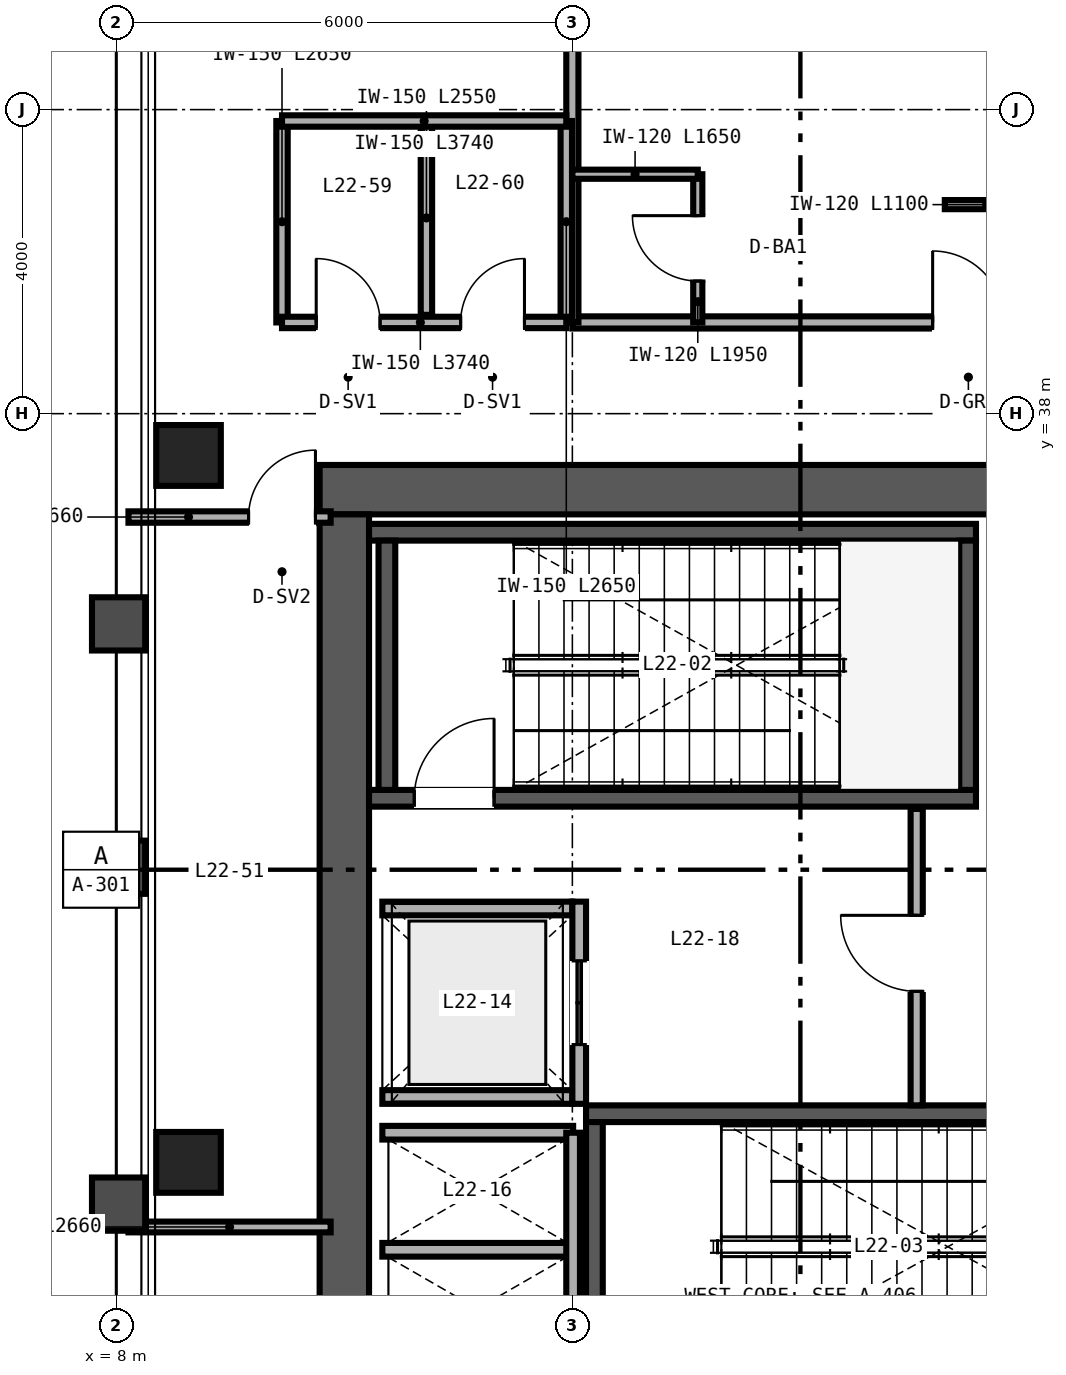
"""IFC4 building model, lengths in metres.
Left out: names, types, materials, properties, quantities, classifications, styles, units other than length and angle.
Written with IfcOpenShell. Run it as: python <this file> out.ifc"""

import sys

from ifc_helpers import new_model, si_unit, direction, frame, frame_2d, origin, origin_2d, place, context, subcontext, project, spatial, rectangle, hollow_rectangle, extrude, source, transform, mapped, element, fill, save


model = new_model("IFC4")
c1 = context("Model", 3, precision=1e-05, world=origin(), true_north=direction((0.0, 1.0)))
c2 = subcontext(c1, "Body", "Model", "MODEL_VIEW")
j1 = project(units=[si_unit("LENGTHUNIT", "METRE"), si_unit("PLANEANGLEUNIT", "RADIAN")], contexts=[c1])
p1 = place(None, origin())
s1 = spatial("IfcSite", under=j1, at=p1, CompositionType="ELEMENT")
p2 = place(p1, origin())
s2 = spatial("IfcBuilding", under=s1, at=p2, CompositionType="ELEMENT")
p3 = place(p2, frame((0.0, 0.0, 92.4)))
s3 = spatial("IfcBuildingStorey", under=s2, at=p3, CompositionType="ELEMENT", Elevation=92.4)
p4 = place(p3, frame((10.675, 37.0, 0.0), z_axis=(0.0, 0.0, 1.0), x_axis=(1.0, 0.0, 0.0)))
e1 = element("IfcWall", 1, at=p4, inside=s3, PredefinedType="SHEAR", context=c2, shape_type="SweptSolid", body=[
    extrude(rectangle(XDim=12.65, YDim=0.65, at=frame_2d((6.325, 0.0))), origin(), (0.0, 0.0, 1.0), 4.56),
])
p5 = place(p4, frame((8.905, 0.0, 0.0)))
e2 = element("IfcOpeningElement", 2, at=p5, cuts=e1, PredefinedType="OPENING", context=c2, shape_type="SweptSolid", body=[
    extrude(rectangle(XDim=1.0, YDim=2.15, at=frame_2d((0.5, 1.075))), frame((0.0, 0.335, 0.0), z_axis=(0.0, -1.0, 0.0), x_axis=(1.0, 0.0, 0.0)), (0.0, 0.0, 1.0), 0.67),
])
p6 = place(p3, frame((11.0, 15.325, 0.0), z_axis=(0.0, 0.0, 1.0), x_axis=(0.0, 1.0, 0.0)))
e3 = element("IfcWall", 3, at=p6, inside=s3, PredefinedType="SHEAR", context=c2, shape_type="SweptSolid", body=[
    extrude(rectangle(XDim=21.35, YDim=0.65, at=frame_2d((10.675, 0.0))), origin(), (0.0, 0.0, 1.0), 4.56),
])
p7 = place(p3, frame((11.325, 32.94, 0.0), z_axis=(0.0, 0.0, 1.0), x_axis=(1.0, 0.0, 0.0)))
e4 = element("IfcWall", 4, at=p7, inside=s3, PredefinedType="SHEAR", context=c2, shape_type="SweptSolid", body=[
    extrude(rectangle(XDim=7.985, YDim=0.22, at=frame_2d((3.993, 0.0))), origin(), (0.0, 0.0, 1.0), 4.6),
])
p8 = place(p7, frame((0.595, 0.0, 0.0)))
e5 = element("IfcOpeningElement", 5, at=p8, cuts=e4, PredefinedType="OPENING", context=c2, shape_type="SweptSolid", body=[
    extrude(rectangle(XDim=1.05, YDim=2.15, at=frame_2d((0.525, 1.075))), frame((0.0, 0.12, 0.0), z_axis=(0.0, -1.0, 0.0), x_axis=(1.0, 0.0, 0.0)), (0.0, 0.0, 1.0), 0.24),
])
p9 = place(p3, frame((11.325, 36.44, 0.0), z_axis=(0.0, 0.0, 1.0), x_axis=(1.0, 0.0, 0.0)))
e6 = element("IfcWall", 6, at=p9, inside=s3, PredefinedType="SHEAR", context=c2, shape_type="SweptSolid", body=[
    extrude(rectangle(XDim=7.985, YDim=0.22, at=frame_2d((3.993, 0.0))), origin(), (0.0, 0.0, 1.0), 4.6),
])
for number, where, z_axis, x_axis in (
    (7, (11.56, 33.05, 0.0), (0.0, 0.0, 1.0), (0.0, 1.0, 0.0)),
    (8, (19.2, 33.05, 0.0), (0.0, 0.0, 1.0), (0.0, 1.0, 0.0)),
):
    element("IfcWall", number, at=place(p3, frame(where, z_axis=z_axis, x_axis=x_axis)), inside=s3, PredefinedType="SHEAR", context=c2, shape_type="SweptSolid", body=[
        extrude(rectangle(XDim=3.28, YDim=0.22, at=frame_2d((1.64, 0.0))), origin(), (0.0, 0.0, 1.0), 4.6),
    ])
p10 = place(p3, frame((14.18, 28.79, 0.0), z_axis=(0.0, 0.0, 1.0), x_axis=(1.0, 0.0, 0.0)))
e9 = element("IfcWall", 9, at=p10, inside=s3, PredefinedType="SHEAR", context=c2, shape_type="SweptSolid", body=[
    extrude(rectangle(XDim=8.495, YDim=0.22, at=frame_2d((4.248, 0.0))), origin(), (0.0, 0.0, 1.0), 4.6),
])
p11 = place(p3, frame((14.29, 25.4, 0.0), z_axis=(0.0, 0.0, 1.0), x_axis=(0.0, 1.0, 0.0)))
e10 = element("IfcWall", 10, at=p11, inside=s3, PredefinedType="SHEAR", context=c2, shape_type="SweptSolid", body=[
    extrude(rectangle(XDim=3.28, YDim=0.22, at=frame_2d((1.64, 0.0))), origin(), (0.0, 0.0, 1.0), 4.6),
])
m1 = source(origin(), c2, "Body", "SweptSolid", [
    extrude(hollow_rectangle(XDim=0.85, YDim=0.8, WallThickness=0.032, at=origin_2d()), origin(), (0.0, 0.0, 1.0), 4.56),
])
for number, where, z_axis, x_axis in (
    (11, (8.95, 28.15, 0.0), (0.0, 0.0, 1.0), (1.0, 0.0, 0.0)),
    (12, (8.95, 37.45, 0.0), (0.0, 0.0, 1.0), (1.0, 0.0, 0.0)),
):
    element("IfcColumn", number, at=place(p3, frame(where, z_axis=z_axis, x_axis=x_axis)), inside=s3, PredefinedType="COLUMN", context=c2, shape_type="MappedRepresentation", body=[
        mapped(m1, transform((0.0, 0.0, 0.0), scale=1.0)),
    ])
for number, where, z_axis, x_axis in (
    (13, (11.5, 29.01, 0.0), (0.0, 0.0, 1.0), (1.0, 0.0, 0.0)),
    (14, (11.5, 31.49, 0.0), (0.0, 0.0, 1.0), (1.0, 0.0, 0.0)),
):
    element("IfcWall", number, at=place(p3, frame(where, z_axis=z_axis, x_axis=x_axis)), inside=s3, PredefinedType="SOLIDWALL", context=c2, shape_type="SweptSolid", body=[
        extrude(rectangle(XDim=2.5, YDim=0.18, at=frame_2d((1.25, 0.0))), origin(), (0.0, 0.0, 1.0), 4.56),
    ])
p12 = place(p3, frame((14.09, 28.92, 0.0), z_axis=(0.0, 0.0, 1.0), x_axis=(0.0, 1.0, 0.0)))
e15 = element("IfcWall", 15, at=p12, inside=s3, PredefinedType="SOLIDWALL", context=c2, shape_type="SweptSolid", body=[
    extrude(rectangle(XDim=2.66, YDim=0.18, at=frame_2d((1.33, 0.0))), origin(), (0.0, 0.0, 1.0), 4.56),
])
p13 = place(p12, frame((0.78, 0.0, 0.0)))
e16 = element("IfcOpeningElement", 16, at=p13, cuts=e15, PredefinedType="OPENING", context=c2, shape_type="SweptSolid", body=[
    extrude(rectangle(XDim=1.1, YDim=2.2, at=frame_2d((0.55, 1.1))), frame((0.0, 0.1, 0.0), z_axis=(0.0, -1.0, 0.0), x_axis=(1.0, 0.0, 0.0)), (0.0, 0.0, 1.0), 0.2),
])
for number, where, z_axis, x_axis in (
    (17, (11.5, 27.0, 0.0), (0.0, 0.0, 1.0), (1.0, 0.0, 0.0)),
    (18, (11.5, 28.54, 0.0), (0.0, 0.0, 1.0), (1.0, 0.0, 0.0)),
):
    element("IfcWall", number, at=place(p3, frame(where, z_axis=z_axis, x_axis=x_axis)), inside=s3, PredefinedType="SOLIDWALL", context=c2, shape_type="SweptSolid", body=[
        extrude(rectangle(XDim=2.51, YDim=0.18, at=frame_2d((1.255, 0.0))), origin(), (0.0, 0.0, 1.0), 4.56),
    ])
p14 = place(p3, frame((14.01, 25.46, 0.0), z_axis=(0.0, 0.0, 1.0), x_axis=(0.0, 1.0, 0.0)))
e19 = element("IfcWall", 19, at=p14, inside=s3, PredefinedType="SOLIDWALL", context=c2, shape_type="SweptSolid", body=[
    extrude(rectangle(XDim=3.08, YDim=0.18, at=frame_2d((1.54, 0.0))), origin(), (0.0, 0.0, 1.0), 4.56),
])
p15 = place(p3, frame((18.53, 28.9, 0.0), z_axis=(0.0, 0.0, 1.0), x_axis=(0.0, 1.0, 0.0)))
e20 = element("IfcWall", 20, at=p15, inside=s3, PredefinedType="PARTITIONING", context=c2, shape_type="SweptSolid", body=[
    extrude(rectangle(XDim=3.9, YDim=0.16, at=frame_2d((1.95, 0.0))), origin(), (0.0, 0.0, 1.0), 4.56),
])
p16 = place(p15, frame((1.5, 0.0, 0.0)))
e21 = element("IfcOpeningElement", 21, at=p16, cuts=e20, PredefinedType="OPENING", context=c2, shape_type="SweptSolid", body=[
    extrude(rectangle(XDim=1.0, YDim=2.15, at=frame_2d((0.5, 1.075))), frame((0.0, 0.09, 0.0), z_axis=(0.0, -1.0, 0.0), x_axis=(1.0, 0.0, 0.0)), (0.0, 0.0, 1.0), 0.18),
])
p17 = place(p3, frame((14.0, 39.2, 0.0), z_axis=(0.0, 0.0, 1.0), x_axis=(1.0, 0.0, 0.0)))
e22 = element("IfcWall", 22, at=p17, inside=s3, PredefinedType="PARTITIONING", context=c2, shape_type="SweptSolid", body=[
    extrude(rectangle(XDim=36.0, YDim=0.16, at=frame_2d((18.0, 0.0))), origin(), (0.0, 0.0, 1.0), 3.781),
])
p18 = place(p17, frame((4.74, 0.0, 0.0)))
e23 = element("IfcOpeningElement", 23, at=p18, cuts=e22, PredefinedType="OPENING", context=c2, shape_type="SweptSolid", body=[
    extrude(rectangle(XDim=0.94, YDim=2.15, at=frame_2d((0.47, 1.075))), frame((0.0, 0.09, 0.0), z_axis=(0.0, -1.0, 0.0), x_axis=(1.0, 0.0, 0.0)), (0.0, 0.0, 1.0), 0.18),
])
p19 = place(p17, frame((10.74, 0.0, 0.0)))
e24 = element("IfcOpeningElement", 24, at=p19, cuts=e22, PredefinedType="OPENING", context=c2, shape_type="SweptSolid", body=[
    extrude(rectangle(XDim=0.94, YDim=2.15, at=frame_2d((0.47, 1.075))), frame((0.0, 0.09, 0.0), z_axis=(0.0, -1.0, 0.0), x_axis=(1.0, 0.0, 0.0)), (0.0, 0.0, 1.0), 0.18),
])
p20 = place(p17, frame((14.77, 0.0, 0.0)))
e25 = element("IfcOpeningElement", 25, at=p20, cuts=e22, PredefinedType="OPENING", context=c2, shape_type="SweptSolid", body=[
    extrude(rectangle(XDim=0.96, YDim=2.15, at=frame_2d((0.48, 1.075))), frame((0.0, 0.09, 0.0), z_axis=(0.0, -1.0, 0.0), x_axis=(1.0, 0.0, 0.0)), (0.0, 0.0, 1.0), 0.18),
])
p21 = place(p17, frame((23.74, 0.0, 0.0)))
e26 = element("IfcOpeningElement", 26, at=p21, cuts=e22, PredefinedType="OPENING", context=c2, shape_type="SweptSolid", body=[
    extrude(rectangle(XDim=0.94, YDim=2.15, at=frame_2d((0.47, 1.075))), frame((0.0, 0.09, 0.0), z_axis=(0.0, -1.0, 0.0), x_axis=(1.0, 0.0, 0.0)), (0.0, 0.0, 1.0), 0.18),
])
p22 = place(p17, frame((29.24, 0.0, 0.0)))
e27 = element("IfcOpeningElement", 27, at=p22, cuts=e22, PredefinedType="OPENING", context=c2, shape_type="SweptSolid", body=[
    extrude(rectangle(XDim=0.94, YDim=2.15, at=frame_2d((0.47, 1.075))), frame((0.0, 0.09, 0.0), z_axis=(0.0, -1.0, 0.0), x_axis=(1.0, 0.0, 0.0)), (0.0, 0.0, 1.0), 0.18),
])
p23 = place(p17, frame((34.74, 0.0, 0.0)))
e28 = element("IfcOpeningElement", 28, at=p23, cuts=e22, PredefinedType="OPENING", context=c2, shape_type="SweptSolid", body=[
    extrude(rectangle(XDim=0.94, YDim=2.15, at=frame_2d((0.47, 1.075))), frame((0.0, 0.09, 0.0), z_axis=(0.0, -1.0, 0.0), x_axis=(1.0, 0.0, 0.0)), (0.0, 0.0, 1.0), 0.18),
])
p24 = place(p3, frame((14.0, 39.2, 0.0), z_axis=(0.0, 0.0, 1.0), x_axis=(0.0, 1.0, 0.0)))
e29 = element("IfcWall", 29, at=p24, inside=s3, PredefinedType="PARTITIONING", context=c2, shape_type="SweptSolid", body=[
    extrude(rectangle(XDim=10.44, YDim=0.16, at=frame_2d((5.22, 0.0))), origin(), (0.0, 0.0, 1.0), 3.867),
])
p25 = place(p3, frame((15.65, 39.2, 0.0), z_axis=(0.0, 0.0, 1.0), x_axis=(0.0, 1.0, 0.0)))
e30 = element("IfcWall", 30, at=p25, inside=s3, PredefinedType="PARTITIONING", context=c2, shape_type="SweptSolid", body=[
    extrude(rectangle(XDim=1.95, YDim=0.12, at=frame_2d((0.975, 0.0))), origin(), (0.0, 0.0, 1.0), 4.56),
])
p26 = place(p25, frame((0.545, 0.0, 0.0)))
e31 = element("IfcOpeningElement", 31, at=p26, cuts=e30, PredefinedType="OPENING", context=c2, shape_type="SweptSolid", body=[
    extrude(rectangle(XDim=0.86, YDim=2.1, at=frame_2d((0.43, 1.05))), frame((0.0, 0.07, 0.0), z_axis=(0.0, -1.0, 0.0), x_axis=(1.0, 0.0, 0.0)), (0.0, 0.0, 1.0), 0.14),
])
p27 = place(p3, frame((14.0, 41.15, 0.0), z_axis=(0.0, 0.0, 1.0), x_axis=(1.0, 0.0, 0.0)))
e32 = element("IfcWall", 32, at=p27, inside=s3, PredefinedType="PARTITIONING", context=c2, shape_type="SweptSolid", body=[
    extrude(rectangle(XDim=1.65, YDim=0.12, at=frame_2d((0.825, 0.0))), origin(), (0.0, 0.0, 1.0), 4.56),
])
p28 = place(p3, frame((18.9, 40.75, 0.0), z_axis=(0.0, 0.0, 1.0), x_axis=(1.0, 0.0, 0.0)))
e33 = element("IfcWall", 33, at=p28, inside=s3, PredefinedType="PARTITIONING", context=c2, shape_type="SweptSolid", body=[
    extrude(rectangle(XDim=1.1, YDim=0.12, at=frame_2d((0.55, 0.0))), origin(), (0.0, 0.0, 1.0), 4.56),
])
p29 = place(p3, frame((8.16, 36.64, 0.0), z_axis=(0.0, 0.0, 1.0), x_axis=(1.0, 0.0, 0.0)))
e34 = element("IfcWall", 34, at=p29, inside=s3, PredefinedType="PARTITIONING", context=c2, shape_type="SweptSolid", body=[
    extrude(rectangle(XDim=2.66, YDim=0.15, at=frame_2d((1.33, 0.0))), origin(), (0.0, 0.0, 1.0), 3.943),
])
p30 = place(p29, frame((1.58, 0.0, 0.0)))
e35 = element("IfcOpeningElement", 35, at=p30, cuts=e34, PredefinedType="OPENING", context=c2, shape_type="SweptSolid", body=[
    extrude(rectangle(XDim=0.88, YDim=2.15, at=frame_2d((0.44, 1.075))), frame((0.0, 0.085, 0.0), z_axis=(0.0, -1.0, 0.0), x_axis=(1.0, 0.0, 0.0)), (0.0, 0.0, 1.0), 0.17),
])
p31 = place(p3, frame((8.16, 27.3, 0.0), z_axis=(0.0, 0.0, 1.0), x_axis=(1.0, 0.0, 0.0)))
e36 = element("IfcWall", 36, at=p31, inside=s3, PredefinedType="PARTITIONING", context=c2, shape_type="SweptSolid", body=[
    extrude(rectangle(XDim=2.66, YDim=0.142, at=frame_2d((1.33, 0.0))), origin(), (0.0, 0.0, 1.0), 3.781),
])
p32 = place(p3, frame((12.08, 39.3, 0.0), z_axis=(0.0, 0.0, 1.0), x_axis=(0.0, 1.0, 0.0)))
e37 = element("IfcWall", 37, at=p32, inside=s3, PredefinedType="PARTITIONING", context=c2, shape_type="SweptSolid", body=[
    extrude(rectangle(XDim=2.55, YDim=0.15, at=frame_2d((1.275, 0.0))), origin(), (0.0, 0.0, 1.0), 4.56),
])
for number, where, z_axis, x_axis in (
    (38, (10.18, 39.2, 0.0), (0.0, 0.0, 1.0), (0.0, 1.0, 0.0)),
    (39, (13.92, 39.2, 0.0), (0.0, 0.0, 1.0), (0.0, 1.0, 0.0)),
):
    element("IfcWall", number, at=place(p3, frame(where, z_axis=z_axis, x_axis=x_axis)), inside=s3, PredefinedType="PARTITIONING", context=c2, shape_type="SweptSolid", body=[
        extrude(rectangle(XDim=2.65, YDim=0.15, at=frame_2d((1.325, 0.0))), origin(), (0.0, 0.0, 1.0), 4.56),
    ])
p33 = place(p3, frame((10.18, 41.85, 0.0), z_axis=(0.0, 0.0, 1.0), x_axis=(1.0, 0.0, 0.0)))
e40 = element("IfcWall", 40, at=p33, inside=s3, PredefinedType="PARTITIONING", context=c2, shape_type="SweptSolid", body=[
    extrude(rectangle(XDim=3.74, YDim=0.15, at=frame_2d((1.87, 0.0))), origin(), (0.0, 0.0, 1.0), 4.56),
])
p34 = place(p3, frame((10.18, 39.2, 0.0), z_axis=(0.0, 0.0, 1.0), x_axis=(1.0, 0.0, 0.0)))
e41 = element("IfcWall", 41, at=p34, inside=s3, PredefinedType="PARTITIONING", context=c2, shape_type="SweptSolid", body=[
    extrude(rectangle(XDim=3.74, YDim=0.15, at=frame_2d((1.87, 0.0))), origin(), (0.0, 0.0, 1.0), 4.56),
])
p35 = place(p34, frame((0.45, 0.0, 0.0)))
e42 = element("IfcOpeningElement", 42, at=p35, cuts=e41, PredefinedType="OPENING", context=c2, shape_type="SweptSolid", body=[
    extrude(rectangle(XDim=0.84, YDim=2.1, at=frame_2d((0.42, 1.05))), frame((0.0, 0.085, 0.0), z_axis=(0.0, -1.0, 0.0), x_axis=(1.0, 0.0, 0.0)), (0.0, 0.0, 1.0), 0.17),
])
p36 = place(p34, frame((2.35, 0.0, 0.0)))
e43 = element("IfcOpeningElement", 43, at=p36, cuts=e41, PredefinedType="OPENING", context=c2, shape_type="SweptSolid", body=[
    extrude(rectangle(XDim=0.84, YDim=2.1, at=frame_2d((0.42, 1.05))), frame((0.0, 0.085, 0.0), z_axis=(0.0, -1.0, 0.0), x_axis=(1.0, 0.0, 0.0)), (0.0, 0.0, 1.0), 0.17),
])
m2 = source(origin(), c2, "Body", "SweptSolid", [
    extrude(rectangle(XDim=1.05, YDim=2.15, at=frame_2d((0.525, 1.075))), frame((0.0, 0.025, 0.0), z_axis=(0.0, -1.0, 0.0), x_axis=(1.0, 0.0, 0.0)), (0.0, 0.0, 1.0), 0.05),
])
p37 = place(p8, origin())
e44 = element("IfcDoor", 44, at=p37, inside=s3, OperationType="SINGLE_SWING_RIGHT", PredefinedType="DOOR", context=c2, shape_type="MappedRepresentation", body=[
    mapped(m2, transform((0.0, 0.0, 0.0), scale=1.0)),
])
fill(e5, e44)
m3 = source(origin(), c2, "Body", "SweptSolid", [
    extrude(rectangle(XDim=1.1, YDim=2.2, at=frame_2d((0.55, 1.1))), frame((0.0, 0.025, 0.0), z_axis=(0.0, -1.0, 0.0), x_axis=(1.0, 0.0, 0.0)), (0.0, 0.0, 1.0), 0.05),
])
p38 = place(p13, origin())
e45 = element("IfcDoor", 45, at=p38, inside=s3, OperationType="DOUBLE_DOOR_SLIDING", PredefinedType="DOOR", context=c2, shape_type="MappedRepresentation", body=[
    mapped(m3, transform((0.0, 0.0, 0.0), scale=1.0)),
])
fill(e16, e45)
m4 = source(origin(), c2, "Body", "SweptSolid", [
    extrude(rectangle(XDim=1.0, YDim=2.15, at=frame_2d((0.5, 1.075))), frame((0.0, 0.025, 0.0), z_axis=(0.0, -1.0, 0.0), x_axis=(1.0, 0.0, 0.0)), (0.0, 0.0, 1.0), 0.05),
])
p39 = place(p16, origin())
e46 = element("IfcDoor", 46, at=p39, inside=s3, OperationType="SINGLE_SWING_RIGHT", PredefinedType="DOOR", context=c2, shape_type="MappedRepresentation", body=[
    mapped(m4, transform((0.0, 0.0, 0.0), scale=1.0)),
])
fill(e21, e46)
m5 = source(origin(), c2, "Body", "SweptSolid", [
    extrude(rectangle(XDim=0.86, YDim=2.1, at=frame_2d((0.43, 1.05))), frame((0.0, 0.025, 0.0), z_axis=(0.0, -1.0, 0.0), x_axis=(1.0, 0.0, 0.0)), (0.0, 0.0, 1.0), 0.05),
])
p40 = place(p26, origin())
e47 = element("IfcDoor", 47, at=p40, inside=s3, OperationType="SINGLE_SWING_RIGHT", PredefinedType="DOOR", context=c2, shape_type="MappedRepresentation", body=[
    mapped(m5, transform((0.0, 0.0, 0.0), scale=1.0)),
])
fill(e31, e47)
m6 = source(origin(), c2, "Body", "SweptSolid", [
    extrude(rectangle(XDim=0.94, YDim=2.15, at=frame_2d((0.47, 1.075))), frame((0.0, 0.025, 0.0), z_axis=(0.0, -1.0, 0.0), x_axis=(1.0, 0.0, 0.0)), (0.0, 0.0, 1.0), 0.05),
])
p41 = place(p18, origin())
e48 = element("IfcDoor", 48, at=p41, inside=s3, OperationType="SINGLE_SWING_LEFT", PredefinedType="DOOR", context=c2, shape_type="MappedRepresentation", body=[
    mapped(m6, transform((0.0, 0.0, 0.0), scale=1.0)),
])
fill(e23, e48)
m7 = source(origin(), c2, "Body", "SweptSolid", [
    extrude(rectangle(XDim=0.88, YDim=2.15, at=frame_2d((0.44, 1.075))), frame((0.0, 0.025, 0.0), z_axis=(0.0, -1.0, 0.0), x_axis=(1.0, 0.0, 0.0)), (0.0, 0.0, 1.0), 0.05),
])
p42 = place(p30, origin())
e49 = element("IfcDoor", 49, at=p42, inside=s3, OperationType="SINGLE_SWING_RIGHT", PredefinedType="DOOR", context=c2, shape_type="MappedRepresentation", body=[
    mapped(m7, transform((0.0, 0.0, 0.0), scale=1.0)),
])
fill(e35, e49)
m8 = source(origin(), c2, "Body", "SweptSolid", [
    extrude(rectangle(XDim=0.84, YDim=2.1, at=frame_2d((0.42, 1.05))), frame((0.0, 0.025, 0.0), z_axis=(0.0, -1.0, 0.0), x_axis=(1.0, 0.0, 0.0)), (0.0, 0.0, 1.0), 0.05),
])
p43 = place(p35, origin())
e50 = element("IfcDoor", 50, at=p43, inside=s3, OperationType="SINGLE_SWING_LEFT", PredefinedType="DOOR", context=c2, shape_type="MappedRepresentation", body=[
    mapped(m8, transform((0.0, 0.0, 0.0), scale=1.0)),
])
fill(e42, e50)
p44 = place(p36, origin())
e51 = element("IfcDoor", 51, at=p44, inside=s3, OperationType="SINGLE_SWING_RIGHT", PredefinedType="DOOR", context=c2, shape_type="MappedRepresentation", body=[
    mapped(m8, transform((0.0, 0.0, 0.0), scale=1.0)),
])
fill(e43, e51)
save(model, sys.argv[1])
